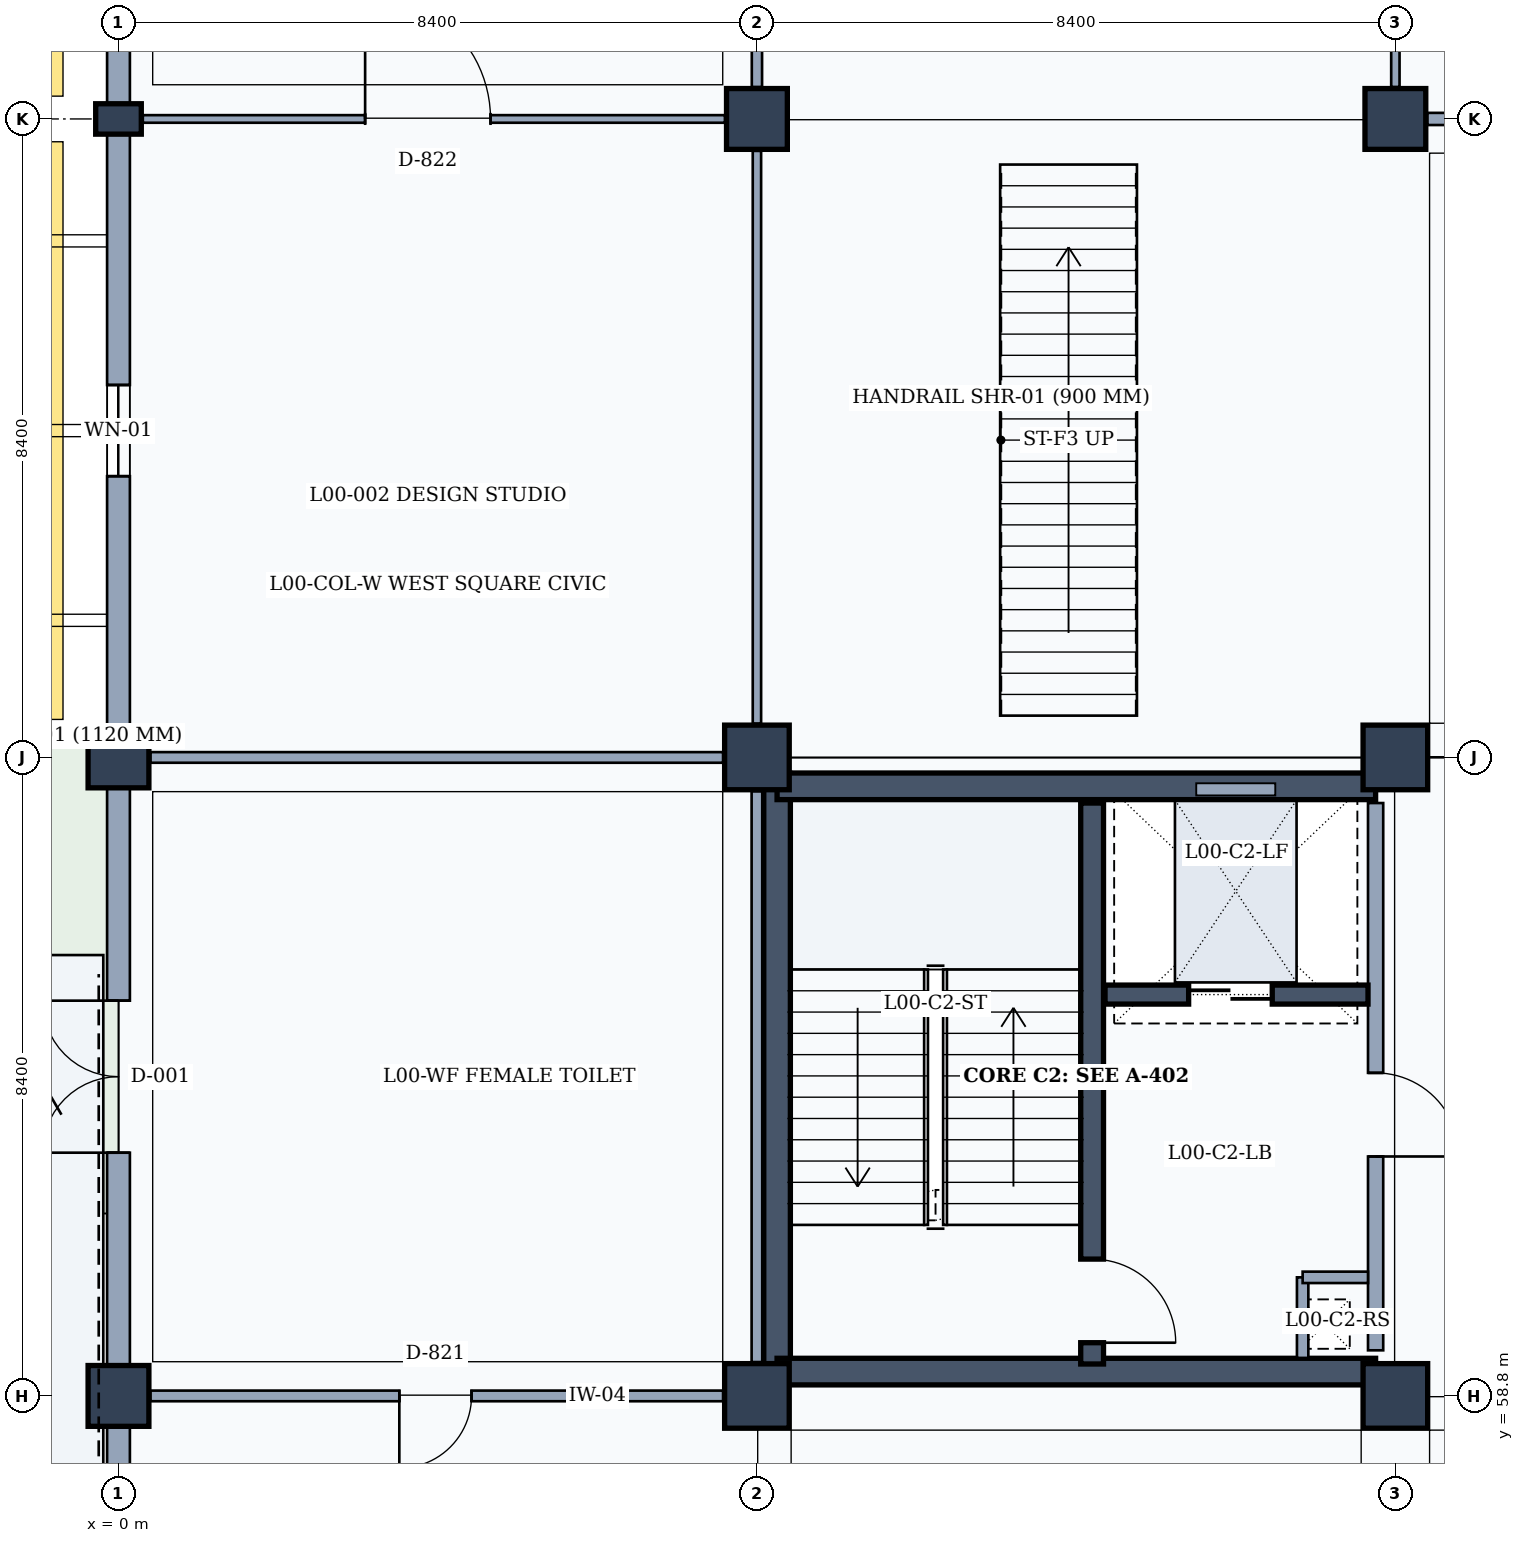
"""IFC4 building model, lengths in metres.
Left out: names, types, materials, properties, quantities, classifications, styles, units other than length and angle.
Written with IfcOpenShell. Run it as: python <this file> out.ifc"""

import sys

from ifc_helpers import new_model, si_unit, direction, frame, frame_2d, origin, origin_2d, place, context, subcontext, project, spatial, rectangle, extrude, element, fill, save


model = new_model("IFC4")
c1 = context("Model", 3, precision=1e-05, world=origin(), true_north=direction((0.0, 1.0)))
c2 = subcontext(c1, "Body", "Model", "MODEL_VIEW")
j1 = project(units=[si_unit("LENGTHUNIT", "METRE"), si_unit("PLANEANGLEUNIT", "RADIAN")], contexts=[c1])
p1 = place(None, origin())
s1 = spatial("IfcSite", under=j1, at=p1, CompositionType="ELEMENT")
p2 = place(p1, origin())
s2 = spatial("IfcBuilding", under=s1, at=p2, CompositionType="ELEMENT")
p3 = place(p2, origin())
s3 = spatial("IfcBuildingStorey", under=s2, at=p3, CompositionType="ELEMENT", Elevation=0.0)
for number, where, z_axis, x_axis in (
    (1, (0.0, 58.8, 0.0), (0.0, 0.0, 1.0), (1.0, 0.0, 0.0)),
    (2, (0.0, 67.2, 0.0), (0.0, 0.0, 1.0), (1.0, 0.0, 0.0)),
):
    element("IfcColumn", number, at=place(p3, frame(where, z_axis=z_axis, x_axis=x_axis)), inside=s3, PredefinedType="COLUMN", context=c2, shape_type="SweptSolid", body=[
        extrude(rectangle(XDim=0.8, YDim=0.8, at=origin_2d()), origin(), (0.0, 0.0, 1.0), 4.8),
    ])
p4 = place(p3, frame((0.0, 75.6, 0.0), z_axis=(0.0, 0.0, 1.0), x_axis=(1.0, 0.0, 0.0)))
e3 = element("IfcColumn", 3, at=p4, inside=s3, PredefinedType="PILASTER", context=c2, shape_type="SweptSolid", body=[
    extrude(rectangle(XDim=0.6, YDim=0.4, at=origin_2d()), origin(), (0.0, 0.0, 1.0), 4.8),
])
for number, where, z_axis, x_axis in (
    (4, (8.4, 58.8, 0.0), (0.0, 0.0, 1.0), (1.0, 0.0, 0.0)),
    (5, (8.4, 67.2, 0.0), (0.0, 0.0, 1.0), (1.0, 0.0, 0.0)),
):
    element("IfcColumn", number, at=place(p3, frame(where, z_axis=z_axis, x_axis=x_axis)), inside=s3, PredefinedType="COLUMN", context=c2, shape_type="SweptSolid", body=[
        extrude(rectangle(XDim=0.85, YDim=0.85, at=origin_2d()), origin(), (0.0, 0.0, 1.0), 4.8),
    ])
p5 = place(p3, frame((8.4, 75.6, 0.0), z_axis=(0.0, 0.0, 1.0), x_axis=(1.0, 0.0, 0.0)))
e6 = element("IfcColumn", 6, at=p5, inside=s3, PredefinedType="COLUMN", context=c2, shape_type="SweptSolid", body=[
    extrude(rectangle(XDim=0.8, YDim=0.8, at=origin_2d()), origin(), (0.0, 0.0, 1.0), 4.8),
])
for number, where, z_axis, x_axis in (
    (7, (16.8, 58.8, 0.0), (0.0, 0.0, 1.0), (1.0, 0.0, 0.0)),
    (8, (16.8, 67.2, 0.0), (0.0, 0.0, 1.0), (1.0, 0.0, 0.0)),
):
    element("IfcColumn", number, at=place(p3, frame(where, z_axis=z_axis, x_axis=x_axis)), inside=s3, PredefinedType="COLUMN", context=c2, shape_type="SweptSolid", body=[
        extrude(rectangle(XDim=0.85, YDim=0.85, at=origin_2d()), origin(), (0.0, 0.0, 1.0), 4.8),
    ])
p6 = place(p3, frame((16.8, 75.6, 0.0), z_axis=(0.0, 0.0, 1.0), x_axis=(1.0, 0.0, 0.0)))
e9 = element("IfcColumn", 9, at=p6, inside=s3, PredefinedType="COLUMN", context=c2, shape_type="SweptSolid", body=[
    extrude(rectangle(XDim=0.8, YDim=0.8, at=origin_2d()), origin(), (0.0, 0.0, 1.0), 4.8),
])
p7 = place(p3, frame((0.0, 50.6, 0.0), z_axis=(0.0, 0.0, 1.0), x_axis=(0.0, 1.0, 0.0)))
e10 = element("IfcWall", 10, at=p7, inside=s3, PredefinedType="SOLIDWALL", context=c2, shape_type="SweptSolid", body=[
    extrude(rectangle(XDim=7.8, YDim=0.3, at=frame_2d((3.9, 0.0))), origin(), (0.0, 0.0, 1.0), 3.96),
])
p8 = place(p7, frame((3.35, 0.0, 0.95)))
e11 = element("IfcOpeningElement", 11, at=p8, cuts=e10, PredefinedType="OPENING", context=c2, shape_type="SweptSolid", body=[
    extrude(rectangle(XDim=1.1, YDim=1.95, at=frame_2d((0.55, 0.975))), frame((0.0, 0.16, 0.0), z_axis=(0.0, -1.0, 0.0), x_axis=(1.0, 0.0, 0.0)), (0.0, 0.0, 1.0), 0.32),
])
p9 = place(p3, frame((0.0, 59.2, 0.0), z_axis=(0.0, 0.0, 1.0), x_axis=(0.0, 1.0, 0.0)))
e12 = element("IfcWall", 12, at=p9, inside=s3, PredefinedType="SOLIDWALL", context=c2, shape_type="SweptSolid", body=[
    extrude(rectangle(XDim=7.6, YDim=0.3, at=frame_2d((3.8, 0.0))), origin(), (0.0, 0.0, 1.0), 3.96),
])
p10 = place(p9, frame((2.8, 0.0, 0.0)))
e13 = element("IfcOpeningElement", 13, at=p10, cuts=e12, PredefinedType="OPENING", context=c2, shape_type="SweptSolid", body=[
    extrude(rectangle(XDim=2.0, YDim=2.3, at=frame_2d((1.0, 1.15))), frame((0.0, 0.16, 0.0), z_axis=(0.0, -1.0, 0.0), x_axis=(1.0, 0.0, 0.0)), (0.0, 0.0, 1.0), 0.32),
])
p11 = place(p3, frame((0.0, 67.6, 0.0), z_axis=(0.0, 0.0, 1.0), x_axis=(0.0, 1.0, 0.0)))
e14 = element("IfcWall", 14, at=p11, inside=s3, PredefinedType="SOLIDWALL", context=c2, shape_type="SweptSolid", body=[
    extrude(rectangle(XDim=7.8, YDim=0.3, at=frame_2d((3.9, 0.0))), origin(), (0.0, 0.0, 1.0), 3.96),
])
p12 = place(p11, frame((3.3, 0.0, 0.95)))
e15 = element("IfcOpeningElement", 15, at=p12, cuts=e14, PredefinedType="OPENING", context=c2, shape_type="SweptSolid", body=[
    extrude(rectangle(XDim=1.2, YDim=1.8, at=frame_2d((0.6, 0.9))), frame((0.0, 0.16, 0.0), z_axis=(0.0, -1.0, 0.0), x_axis=(1.0, 0.0, 0.0)), (0.0, 0.0, 1.0), 0.32),
])
p13 = place(p3, frame((0.0, 75.8, 0.0), z_axis=(0.0, 0.0, 1.0), x_axis=(0.0, 1.0, 0.0)))
e16 = element("IfcWall", 16, at=p13, inside=s3, PredefinedType="SOLIDWALL", context=c2, shape_type="SweptSolid", body=[
    extrude(rectangle(XDim=7.8, YDim=0.3, at=frame_2d((3.9, 0.0))), origin(), (0.0, 0.0, 1.0), 3.96),
])
p14 = place(p13, frame((2.7, 0.0, 0.95)))
e17 = element("IfcOpeningElement", 17, at=p14, cuts=e16, PredefinedType="OPENING", context=c2, shape_type="SweptSolid", body=[
    extrude(rectangle(XDim=2.4, YDim=1.8, at=frame_2d((1.2, 0.9))), frame((0.0, 0.16, 0.0), z_axis=(0.0, -1.0, 0.0), x_axis=(1.0, 0.0, 0.0)), (0.0, 0.0, 1.0), 0.32),
])
p15 = place(p3, frame((8.665, 59.05, 0.0), z_axis=(0.0, 0.0, 1.0), x_axis=(0.0, 1.0, 0.0)))
e18 = element("IfcWall", 18, at=p15, inside=s3, PredefinedType="SHEAR", context=c2, shape_type="SweptSolid", body=[
    extrude(rectangle(XDim=7.94, YDim=0.35, at=frame_2d((3.97, 0.0))), origin(), (0.0, 0.0, 1.0), 4.55),
])
p16 = place(p3, frame((8.665, 66.82, 0.0), z_axis=(0.0, 0.0, 1.0), x_axis=(1.0, 0.0, 0.0)))
e19 = element("IfcWall", 19, at=p16, inside=s3, PredefinedType="SHEAR", context=c2, shape_type="SweptSolid", body=[
    extrude(rectangle(XDim=7.875, YDim=0.35, at=frame_2d((3.938, 0.0))), origin(), (0.0, 0.0, 1.0), 4.55),
])
p17 = place(p3, frame((16.54, 66.6, 0.0), z_axis=(0.0, 0.0, 1.0), x_axis=(0.0, -1.0, 0.0)))
e20 = element("IfcWall", 20, at=p17, inside=s3, PredefinedType="PARTITIONING", context=c2, shape_type="SweptSolid", body=[
    extrude(rectangle(XDim=7.2, YDim=0.2, at=frame_2d((3.6, 0.0))), origin(), (0.0, 0.0, 1.0), 3.92),
])
p18 = place(p17, frame((3.55, 0.0, 0.0)))
e21 = element("IfcOpeningElement", 21, at=p18, cuts=e20, PredefinedType="OPENING", context=c2, shape_type="SweptSolid", body=[
    extrude(rectangle(XDim=1.1, YDim=2.15, at=frame_2d((0.55, 1.075))), frame((0.0, 0.11, 0.0), z_axis=(0.0, -1.0, 0.0), x_axis=(1.0, 0.0, 0.0)), (0.0, 0.0, 1.0), 0.22),
])
p19 = place(p3, frame((16.54, 59.12, 0.0), z_axis=(0.0, 0.0, 1.0), x_axis=(-1.0, 0.0, 0.0)))
e22 = element("IfcWall", 22, at=p19, inside=s3, PredefinedType="SHEAR", context=c2, shape_type="SweptSolid", body=[
    extrude(rectangle(XDim=7.875, YDim=0.35, at=frame_2d((3.938, 0.0))), origin(), (0.0, 0.0, 1.0), 4.55),
])
p20 = place(p3, frame((12.81, 59.22, 0.0), z_axis=(0.0, 0.0, 1.0), x_axis=(0.0, 1.0, 0.0)))
e23 = element("IfcWall", 23, at=p20, inside=s3, PredefinedType="SHEAR", context=c2, shape_type="SweptSolid", body=[
    extrude(rectangle(XDim=7.38, YDim=0.3, at=frame_2d((3.69, 0.0))), origin(), (0.0, 0.0, 1.0), 4.55),
])
p21 = place(p20, frame((0.28, 0.0, 0.0)))
e24 = element("IfcOpeningElement", 24, at=p21, cuts=e23, PredefinedType="OPENING", context=c2, shape_type="SweptSolid", body=[
    extrude(rectangle(XDim=1.1, YDim=2.15, at=frame_2d((0.55, 1.075))), frame((0.0, 0.16, 0.0), z_axis=(0.0, -1.0, 0.0), x_axis=(1.0, 0.0, 0.0)), (0.0, 0.0, 1.0), 0.32),
])
p22 = place(p3, frame((15.58, 60.36, 0.0), z_axis=(0.0, 0.0, 1.0), x_axis=(0.0, -1.0, 0.0)))
e25 = element("IfcWall", 25, at=p22, inside=s3, PredefinedType="PARTITIONING", context=c2, shape_type="SweptSolid", body=[
    extrude(rectangle(XDim=1.06, YDim=0.15, at=frame_2d((0.53, 0.0))), origin(), (0.0, 0.0, 1.0), 3.92),
])
p23 = place(p3, frame((15.58, 60.36, 0.0), z_axis=(0.0, 0.0, 1.0), x_axis=(1.0, 0.0, 0.0)))
e26 = element("IfcWall", 26, at=p23, inside=s3, PredefinedType="PARTITIONING", context=c2, shape_type="SweptSolid", body=[
    extrude(rectangle(XDim=0.86, YDim=0.15, at=frame_2d((0.43, 0.0))), origin(), (0.0, 0.0, 1.0), 3.92),
])
p24 = place(p3, frame((12.98, 64.08, 0.0), z_axis=(0.0, 0.0, 1.0), x_axis=(1.0, 0.0, 0.0)))
e27 = element("IfcWall", 27, at=p24, inside=s3, PredefinedType="SHEAR", context=c2, shape_type="SweptSolid", body=[
    extrude(rectangle(XDim=3.46, YDim=0.25, at=frame_2d((1.73, 0.0))), origin(), (0.0, 0.0, 1.0), 4.55),
])
p25 = place(p24, frame((1.1, 0.0, 0.0)))
e28 = element("IfcOpeningElement", 28, at=p25, cuts=e27, PredefinedType="OPENING", context=c2, shape_type="SweptSolid", body=[
    extrude(rectangle(XDim=1.1, YDim=2.15, at=frame_2d((0.55, 1.075))), frame((0.0, 0.135, 0.0), z_axis=(0.0, -1.0, 0.0), x_axis=(1.0, 0.0, 0.0)), (0.0, 0.0, 1.0), 0.27),
])
p26 = place(p3, frame((0.42, 58.8, 0.0), z_axis=(0.0, 0.0, 1.0), x_axis=(1.0, 0.0, 0.0)))
e29 = element("IfcWall", 29, at=p26, inside=s3, PredefinedType="PARTITIONING", context=c2, shape_type="SweptSolid", body=[
    extrude(rectangle(XDim=7.535, YDim=0.14, at=frame_2d((3.768, 0.0))), origin(), (0.0, 0.0, 1.0), 3.87),
])
p27 = place(p26, frame((3.275, 0.0, 0.0)))
e30 = element("IfcOpeningElement", 30, at=p27, cuts=e29, PredefinedType="OPENING", context=c2, shape_type="SweptSolid", body=[
    extrude(rectangle(XDim=0.95, YDim=2.15, at=frame_2d((0.475, 1.075))), frame((0.0, 0.08, 0.0), z_axis=(0.0, -1.0, 0.0), x_axis=(1.0, 0.0, 0.0)), (0.0, 0.0, 1.0), 0.16),
])
p28 = place(p3, frame((8.4, 59.245, 0.0), z_axis=(0.0, 0.0, 1.0), x_axis=(0.0, 1.0, 0.0)))
e31 = element("IfcWall", 31, at=p28, inside=s3, PredefinedType="PARTITIONING", context=c2, shape_type="SweptSolid", body=[
    extrude(rectangle(XDim=7.51, YDim=0.14, at=frame_2d((3.755, 0.0))), origin(), (0.0, 0.0, 1.0), 3.92),
])
p29 = place(p3, frame((0.42, 67.2, 0.0), z_axis=(0.0, 0.0, 1.0), x_axis=(1.0, 0.0, 0.0)))
e32 = element("IfcWall", 32, at=p29, inside=s3, PredefinedType="PARTITIONING", context=c2, shape_type="SweptSolid", body=[
    extrude(rectangle(XDim=7.535, YDim=0.14, at=frame_2d((3.768, 0.0))), origin(), (0.0, 0.0, 1.0), 3.87),
])
p30 = place(p3, frame((8.4, 67.645, 0.0), z_axis=(0.0, 0.0, 1.0), x_axis=(0.0, 1.0, 0.0)))
e33 = element("IfcWall", 33, at=p30, inside=s3, PredefinedType="PARTITIONING", context=c2, shape_type="SweptSolid", body=[
    extrude(rectangle(XDim=7.535, YDim=0.11, at=frame_2d((3.768, 0.0))), origin(), (0.0, 0.0, 1.0), 3.92),
])
p31 = place(p3, frame((0.32, 75.6, 0.0), z_axis=(0.0, 0.0, 1.0), x_axis=(1.0, 0.0, 0.0)))
e34 = element("IfcWall", 34, at=p31, inside=s3, PredefinedType="MOVABLE", context=c2, shape_type="SweptSolid", body=[
    extrude(rectangle(XDim=7.66, YDim=0.1, at=frame_2d((3.83, 0.0))), origin(), (0.0, 0.0, 1.0), 3.87),
])
p32 = place(p31, frame((2.925, 0.0, 0.0)))
e35 = element("IfcOpeningElement", 35, at=p32, cuts=e34, PredefinedType="OPENING", context=c2, shape_type="SweptSolid", body=[
    extrude(rectangle(XDim=1.65, YDim=2.25, at=frame_2d((0.825, 1.125))), frame((0.0, 0.06, 0.0), z_axis=(0.0, -1.0, 0.0), x_axis=(1.0, 0.0, 0.0)), (0.0, 0.0, 1.0), 0.12),
])
p33 = place(p3, frame((8.4, 76.02, 0.0), z_axis=(0.0, 0.0, 1.0), x_axis=(0.0, 1.0, 0.0)))
e36 = element("IfcWall", 36, at=p33, inside=s3, PredefinedType="PARTITIONING", context=c2, shape_type="SweptSolid", body=[
    extrude(rectangle(XDim=7.56, YDim=0.135, at=frame_2d((3.78, 0.0))), origin(), (0.0, 0.0, 1.0), 3.92),
])
p34 = place(p33, frame((3.225, 0.0, 0.0)))
e37 = element("IfcOpeningElement", 37, at=p34, cuts=e36, PredefinedType="OPENING", context=c2, shape_type="SweptSolid", body=[
    extrude(rectangle(XDim=1.05, YDim=2.2, at=frame_2d((0.525, 1.1))), frame((0.0, 0.077, 0.0), z_axis=(0.0, -1.0, 0.0), x_axis=(1.0, 0.0, 0.0)), (0.0, 0.0, 1.0), 0.155),
])
p35 = place(p3, frame((16.8, 76.02, 0.0), z_axis=(0.0, 0.0, 1.0), x_axis=(0.0, 1.0, 0.0)))
e38 = element("IfcWall", 38, at=p35, inside=s3, PredefinedType="PARTITIONING", context=c2, shape_type="SweptSolid", body=[
    extrude(rectangle(XDim=7.56, YDim=0.11, at=frame_2d((3.78, 0.0))), origin(), (0.0, 0.0, 1.0), 3.92),
])
p36 = place(p35, frame((3.025, 0.0, 0.0)))
e39 = element("IfcOpeningElement", 39, at=p36, cuts=e38, PredefinedType="OPENING", context=c2, shape_type="SweptSolid", body=[
    extrude(rectangle(XDim=1.45, YDim=2.35, at=frame_2d((0.725, 1.175))), frame((0.0, 0.065, 0.0), z_axis=(0.0, -1.0, 0.0), x_axis=(1.0, 0.0, 0.0)), (0.0, 0.0, 1.0), 0.13),
])
p37 = place(p3, frame((17.22, 75.6, 0.0), z_axis=(0.0, 0.0, 1.0), x_axis=(1.0, 0.0, 0.0)))
e40 = element("IfcWall", 40, at=p37, inside=s3, PredefinedType="PARTITIONING", context=c2, shape_type="SweptSolid", body=[
    extrude(rectangle(XDim=7.56, YDim=0.16, at=frame_2d((3.78, 0.0))), origin(), (0.0, 0.0, 1.0), 3.87),
])
p38 = place(p10, origin())
e41 = element("IfcDoor", 41, at=p38, inside=s3, OperationType="DOUBLE_DOOR_SINGLE_SWING", PredefinedType="DOOR", context=c2, shape_type="SweptSolid", body=[
    extrude(rectangle(XDim=2.0, YDim=2.3, at=frame_2d((1.0, 1.15))), frame((0.0, 0.025, 0.0), z_axis=(0.0, -1.0, 0.0), x_axis=(1.0, 0.0, 0.0)), (0.0, 0.0, 1.0), 0.05),
])
fill(e13, e41)
p39 = place(p12, origin())
e42 = element("IfcWindow", 42, at=p39, inside=s3, PartitioningType="SINGLE_PANEL", PredefinedType="WINDOW", context=c2, shape_type="SweptSolid", body=[
    extrude(rectangle(XDim=1.2, YDim=1.8, at=frame_2d((0.6, 0.9))), frame((0.0, 0.03, 0.0), z_axis=(0.0, -1.0, 0.0), x_axis=(1.0, 0.0, 0.0)), (0.0, 0.0, 1.0), 0.06),
])
fill(e15, e42)
p40 = place(p18, origin())
e43 = element("IfcDoor", 43, at=p40, inside=s3, OperationType="SINGLE_SWING_RIGHT", PredefinedType="DOOR", context=c2, shape_type="SweptSolid", body=[
    extrude(rectangle(XDim=1.1, YDim=2.15, at=frame_2d((0.55, 1.075))), frame((0.0, 0.025, 0.0), z_axis=(0.0, -1.0, 0.0), x_axis=(1.0, 0.0, 0.0)), (0.0, 0.0, 1.0), 0.05),
])
fill(e21, e43)
p41 = place(p21, frame((1.1, 0.0, 0.0), z_axis=(0.0, 0.0, 1.0), x_axis=(-1.0, 0.0, 0.0)))
e44 = element("IfcDoor", 44, at=p41, inside=s3, OperationType="SINGLE_SWING_RIGHT", PredefinedType="DOOR", context=c2, shape_type="SweptSolid", body=[
    extrude(rectangle(XDim=1.1, YDim=2.15, at=frame_2d((0.55, 1.075))), frame((0.0, 0.025, 0.0), z_axis=(0.0, -1.0, 0.0), x_axis=(1.0, 0.0, 0.0)), (0.0, 0.0, 1.0), 0.05),
])
fill(e24, e44)
p42 = place(p25, origin())
e45 = element("IfcDoor", 45, at=p42, inside=s3, OperationType="DOUBLE_DOOR_SLIDING", PredefinedType="DOOR", context=c2, shape_type="SweptSolid", body=[
    extrude(rectangle(XDim=1.1, YDim=2.15, at=frame_2d((0.55, 1.075))), frame((0.0, 0.025, 0.0), z_axis=(0.0, -1.0, 0.0), x_axis=(1.0, 0.0, 0.0)), (0.0, 0.0, 1.0), 0.05),
])
fill(e28, e45)
p43 = place(p27, frame((0.95, 0.0, 0.0), z_axis=(0.0, 0.0, 1.0), x_axis=(-1.0, 0.0, 0.0)))
e46 = element("IfcDoor", 46, at=p43, inside=s3, OperationType="SINGLE_SWING_RIGHT", PredefinedType="DOOR", context=c2, shape_type="SweptSolid", body=[
    extrude(rectangle(XDim=0.95, YDim=2.15, at=frame_2d((0.475, 1.075))), frame((0.0, 0.025, 0.0), z_axis=(0.0, -1.0, 0.0), x_axis=(1.0, 0.0, 0.0)), (0.0, 0.0, 1.0), 0.05),
])
fill(e30, e46)
p44 = place(p32, origin())
e47 = element("IfcDoor", 47, at=p44, inside=s3, OperationType="SINGLE_SWING_LEFT", PredefinedType="DOOR", context=c2, shape_type="SweptSolid", body=[
    extrude(rectangle(XDim=1.65, YDim=2.25, at=frame_2d((0.825, 1.125))), frame((0.0, 0.025, 0.0), z_axis=(0.0, -1.0, 0.0), x_axis=(1.0, 0.0, 0.0)), (0.0, 0.0, 1.0), 0.05),
])
fill(e35, e47)
save(model, sys.argv[1])
